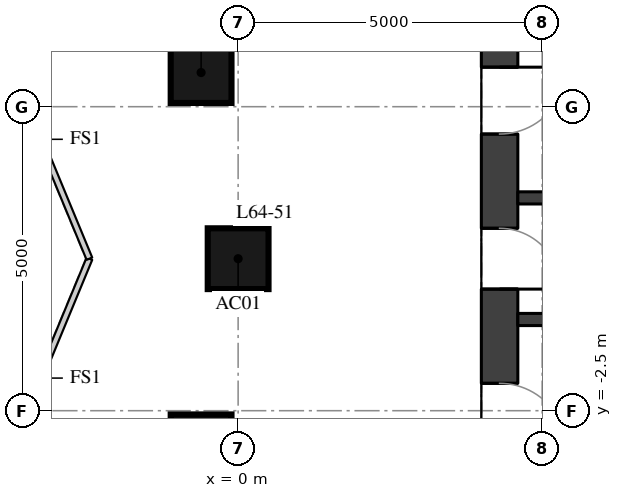
"""IFC4 building model, lengths in metres.
Left out: names, types, materials, properties, quantities, classifications, styles, units other than length and angle.
Written with IfcOpenShell. Run it as: python <this file> out.ifc"""

import sys

from ifc_helpers import new_model, si_unit, direction, frame, frame_2d, origin, origin_2d, place, context, subcontext, project, spatial, rectangle, extrude, element, fill, save


model = new_model("IFC4")
c1 = context("Model", 3, precision=1e-05, world=origin(), true_north=direction((0.0, 1.0)))
c2 = subcontext(c1, "Body", "Model", "MODEL_VIEW")
j1 = project(units=[si_unit("LENGTHUNIT", "METRE"), si_unit("PLANEANGLEUNIT", "RADIAN")], contexts=[c1])
p1 = place(None, origin())
s1 = spatial("IfcSite", under=j1, at=p1, CompositionType="ELEMENT")
p2 = place(p1, origin())
s2 = spatial("IfcBuilding", under=s1, at=p2, CompositionType="ELEMENT")
p3 = place(p2, frame((0.0, 0.0, 225.5)))
s3 = spatial("IfcBuildingStorey", under=s2, at=p3, CompositionType="ELEMENT", Elevation=225.5)
for number, where, z_axis, x_axis in (
    (1, (0.0, 0.0, 0.0), (0.0, 0.0, 1.0), (1.0, 0.0, 0.0)),
    (2, (-0.609, 3.062, 0.0), (0.0, 0.0, 1.0), (1.0, 0.0, 0.0)),
    (3, (-0.609, -3.062, 0.0), (0.0, 0.0, 1.0), (1.0, 0.0, 0.0)),
):
    element("IfcColumn", number, at=place(p3, frame(where, z_axis=z_axis, x_axis=x_axis)), inside=s3, PredefinedType="COLUMN", context=c2, shape_type="SweptSolid", body=[
        extrude(rectangle(XDim=1.0, YDim=1.0, at=origin_2d()), origin(), (0.0, 0.0, 1.0), 3.3),
    ])
p4 = place(p3, frame((4.3, -9.4, 0.0), z_axis=(0.0, 0.0, 1.0), x_axis=(0.0, 1.0, 0.0)))
e4 = element("IfcWall", 4, at=p4, inside=s3, PredefinedType="SHEAR", context=c2, shape_type="SweptSolid", body=[
    extrude(rectangle(XDim=18.8, YDim=0.6, at=frame_2d((9.4, 0.0))), origin(), (0.0, 0.0, 1.0), 2.85),
])
p5 = place(p4, frame((0.65, 0.0, 0.0)))
e5 = element("IfcOpeningElement", 5, at=p5, cuts=e4, PredefinedType="OPENING", context=c2, shape_type="SweptSolid", body=[
    extrude(rectangle(XDim=1.5, YDim=2.1, at=frame_2d((0.75, 1.05))), frame((0.0, 0.31, 0.0), z_axis=(0.0, -1.0, 0.0), x_axis=(1.0, 0.0, 0.0)), (0.0, 0.0, 1.0), 0.62),
])
p6 = place(p4, frame((3.75, 0.0, 0.0)))
e6 = element("IfcOpeningElement", 6, at=p6, cuts=e4, PredefinedType="OPENING", context=c2, shape_type="SweptSolid", body=[
    extrude(rectangle(XDim=1.8, YDim=2.1, at=frame_2d((0.9, 1.05))), frame((0.0, 0.31, 0.0), z_axis=(0.0, -1.0, 0.0), x_axis=(1.0, 0.0, 0.0)), (0.0, 0.0, 1.0), 0.62),
])
p7 = place(p4, frame((6.25, 0.0, 0.0)))
e7 = element("IfcOpeningElement", 7, at=p7, cuts=e4, PredefinedType="OPENING", context=c2, shape_type="SweptSolid", body=[
    extrude(rectangle(XDim=1.1, YDim=2.1, at=frame_2d((0.55, 1.05))), frame((0.0, 0.31, 0.0), z_axis=(0.0, -1.0, 0.0), x_axis=(1.0, 0.0, 0.0)), (0.0, 0.0, 1.0), 0.62),
])
p8 = place(p4, frame((8.9, 0.0, 0.0)))
e8 = element("IfcOpeningElement", 8, at=p8, cuts=e4, PredefinedType="OPENING", context=c2, shape_type="SweptSolid", body=[
    extrude(rectangle(XDim=1.0, YDim=2.1, at=frame_2d((0.5, 1.05))), frame((0.0, 0.31, 0.0), z_axis=(0.0, -1.0, 0.0), x_axis=(1.0, 0.0, 0.0)), (0.0, 0.0, 1.0), 0.62),
])
p9 = place(p4, frame((11.45, 0.0, 0.0)))
e9 = element("IfcOpeningElement", 9, at=p9, cuts=e4, PredefinedType="OPENING", context=c2, shape_type="SweptSolid", body=[
    extrude(rectangle(XDim=1.1, YDim=2.1, at=frame_2d((0.55, 1.05))), frame((0.0, 0.31, 0.0), z_axis=(0.0, -1.0, 0.0), x_axis=(1.0, 0.0, 0.0)), (0.0, 0.0, 1.0), 0.62),
])
p10 = place(p4, frame((13.25, 0.0, 0.0)))
e10 = element("IfcOpeningElement", 10, at=p10, cuts=e4, PredefinedType="OPENING", context=c2, shape_type="SweptSolid", body=[
    extrude(rectangle(XDim=1.8, YDim=2.1, at=frame_2d((0.9, 1.05))), frame((0.0, 0.31, 0.0), z_axis=(0.0, -1.0, 0.0), x_axis=(1.0, 0.0, 0.0)), (0.0, 0.0, 1.0), 0.62),
])
p11 = place(p4, frame((16.65, 0.0, 0.0)))
e11 = element("IfcOpeningElement", 11, at=p11, cuts=e4, PredefinedType="OPENING", context=c2, shape_type="SweptSolid", body=[
    extrude(rectangle(XDim=1.5, YDim=2.1, at=frame_2d((0.75, 1.05))), frame((0.0, 0.31, 0.0), z_axis=(0.0, -1.0, 0.0), x_axis=(1.0, 0.0, 0.0)), (0.0, 0.0, 1.0), 0.62),
])
for number, where, z_axis, x_axis in (
    (12, (4.6, 1.0, 0.0), (0.0, 0.0, 1.0), (1.0, 0.0, 0.0)),
    (13, (4.6, -1.0, 0.0), (0.0, 0.0, 1.0), (1.0, 0.0, 0.0)),
):
    element("IfcWall", number, at=place(p3, frame(where, z_axis=z_axis, x_axis=x_axis)), inside=s3, PredefinedType="SHEAR", context=c2, shape_type="SweptSolid", body=[
        extrude(rectangle(XDim=10.8, YDim=0.2, at=frame_2d((5.4, 0.0))), origin(), (0.0, 0.0, 1.0), 2.85),
    ])
for number, where, z_axis, x_axis in (
    (14, (-2.446, 0.0, 0.0), (0.0, 0.0, 1.0), (-0.383, -0.924, 0.0)),
    (15, (-4.073, 3.927, 0.0), (0.0, 0.0, 1.0), (0.383, -0.924, 0.0)),
):
    element("IfcWall", number, at=place(p3, frame(where, z_axis=z_axis, x_axis=x_axis)), inside=s3, PredefinedType="PARTITIONING", context=c2, shape_type="SweptSolid", body=[
        extrude(rectangle(XDim=4.251, YDim=0.1, at=frame_2d((2.125, 0.0))), origin(), (0.0, 0.0, 1.0), 2.85),
    ])
p12 = place(p7, origin())
e16 = element("IfcDoor", 16, at=p12, inside=s3, OperationType="SINGLE_SWING_RIGHT", PredefinedType="DOOR", context=c2, shape_type="SweptSolid", body=[
    extrude(rectangle(XDim=1.1, YDim=2.1, at=frame_2d((0.55, 1.05))), frame((0.0, 0.025, 0.0), z_axis=(0.0, -1.0, 0.0), x_axis=(1.0, 0.0, 0.0)), (0.0, 0.0, 1.0), 0.05),
])
fill(e7, e16)
p13 = place(p8, origin())
e17 = element("IfcDoor", 17, at=p13, inside=s3, OperationType="SINGLE_SWING_RIGHT", PredefinedType="DOOR", context=c2, shape_type="SweptSolid", body=[
    extrude(rectangle(XDim=1.0, YDim=2.1, at=frame_2d((0.5, 1.05))), frame((0.0, 0.025, 0.0), z_axis=(0.0, -1.0, 0.0), x_axis=(1.0, 0.0, 0.0)), (0.0, 0.0, 1.0), 0.05),
])
fill(e8, e17)
p14 = place(p9, origin())
e18 = element("IfcDoor", 18, at=p14, inside=s3, OperationType="SINGLE_SWING_LEFT", PredefinedType="DOOR", context=c2, shape_type="SweptSolid", body=[
    extrude(rectangle(XDim=1.1, YDim=2.1, at=frame_2d((0.55, 1.05))), frame((0.0, 0.025, 0.0), z_axis=(0.0, -1.0, 0.0), x_axis=(1.0, 0.0, 0.0)), (0.0, 0.0, 1.0), 0.05),
])
fill(e9, e18)
save(model, sys.argv[1])
